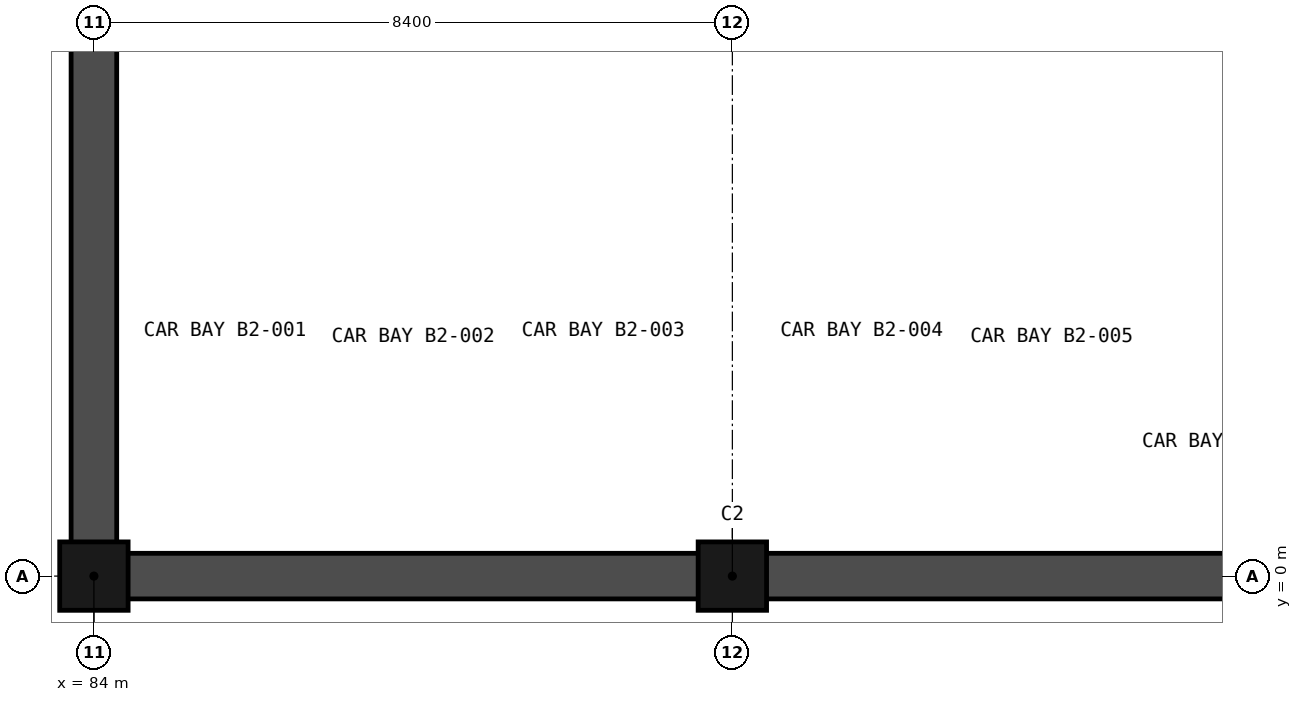
"""IFC4 building model, lengths in metres.
Left out: names, types, materials, properties, quantities, classifications, styles, units other than length and angle.
Written with IfcOpenShell. Run it as: python <this file> out.ifc"""

import sys

from ifc_helpers import new_model, si_unit, direction, frame, frame_2d, origin, origin_2d, place, context, subcontext, project, spatial, rectangle, extrude, element, save


model = new_model("IFC4")
c1 = context("Model", 3, precision=1e-05, world=origin(), true_north=direction((0.0, 1.0)))
c2 = subcontext(c1, "Body", "Model", "MODEL_VIEW")
j1 = project(units=[si_unit("LENGTHUNIT", "METRE"), si_unit("PLANEANGLEUNIT", "RADIAN")], contexts=[c1])
p1 = place(None, origin())
s1 = spatial("IfcSite", under=j1, at=p1, CompositionType="ELEMENT")
p2 = place(p1, origin())
s2 = spatial("IfcBuilding", under=s1, at=p2, CompositionType="ELEMENT")
p3 = place(p2, frame((0.0, 0.0, -9.6)))
s3 = spatial("IfcBuildingStorey", under=s2, at=p3, CompositionType="ELEMENT", Elevation=-9.6)
for number, where, z_axis, x_axis in (
    (1, (84.0, 0.0, -0.25), (0.0, 0.0, 1.0), (1.0, 0.0, 0.0)),
    (2, (92.4, 0.0, -0.25), (0.0, 0.0, 1.0), (1.0, 0.0, 0.0)),
):
    element("IfcColumn", number, at=place(p3, frame(where, z_axis=z_axis, x_axis=x_axis)), inside=s3, PredefinedType="COLUMN", context=c2, shape_type="SweptSolid", body=[
        extrude(rectangle(XDim=0.9, YDim=0.9, at=origin_2d()), origin(), (0.0, 0.0, 1.0), 4.75),
    ])
p4 = place(p3, frame((83.7, 0.0, -0.25), z_axis=(0.0, 0.0, 1.0), x_axis=(1.0, 0.0, 0.0)))
e3 = element("IfcWall", 3, at=p4, inside=s3, PredefinedType="SOLIDWALL", context=c2, shape_type="SweptSolid", body=[
    extrude(rectangle(XDim=84.6, YDim=0.6, at=frame_2d((42.3, 0.0))), origin(), (0.0, 0.0, 1.0), 4.75),
])
p5 = place(p3, frame((84.0, 50.7, -0.25), z_axis=(0.0, 0.0, 1.0), x_axis=(0.0, -1.0, 0.0)))
e4 = element("IfcWall", 4, at=p5, inside=s3, PredefinedType="SOLIDWALL", context=c2, shape_type="SweptSolid", body=[
    extrude(rectangle(XDim=51.0, YDim=0.6, at=frame_2d((25.5, 0.0))), origin(), (0.0, 0.0, 1.0), 4.75),
])
save(model, sys.argv[1])
